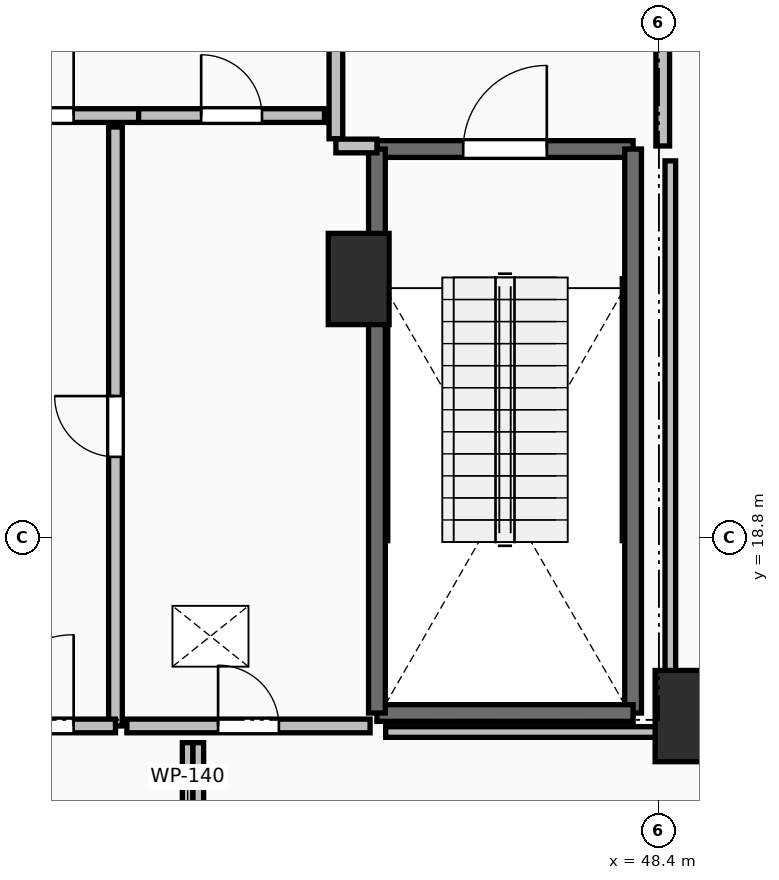
"""IFC4 building model, lengths in metres.
Left out: names, types, materials, properties, quantities, classifications, styles, units other than length and angle.
Written with IfcOpenShell. Run it as: python <this file> out.ifc"""

import sys

from ifc_helpers import new_model, si_unit, direction, frame, frame_2d, origin, origin_2d, place, context, subcontext, project, spatial, rectangle, extrude, element, fill, save


model = new_model("IFC4")
c1 = context("Model", 3, precision=1e-05, world=origin(), true_north=direction((0.0, 1.0)))
c2 = subcontext(c1, "Body", "Model", "MODEL_VIEW")
j1 = project(units=[si_unit("LENGTHUNIT", "METRE"), si_unit("PLANEANGLEUNIT", "RADIAN")], contexts=[c1])
p1 = place(None, origin())
s1 = spatial("IfcSite", under=j1, at=p1, CompositionType="ELEMENT")
p2 = place(p1, origin())
s2 = spatial("IfcBuilding", under=s1, at=p2, CompositionType="ELEMENT")
p3 = place(p2, frame((0.0, 0.0, 174.6)))
s3 = spatial("IfcBuildingStorey", under=s2, at=p3, CompositionType="ELEMENT", Elevation=174.6)
for number, where, z_axis, x_axis in (
    (1, (48.75, 16.45, 0.0), (0.0, 0.0, 1.0), (1.0, 0.0, 0.0)),
    (2, (44.45, 22.2, 0.0), (0.0, 0.0, 1.0), (1.0, 0.0, 0.0)),
):
    element("IfcColumn", number, at=place(p3, frame(where, z_axis=z_axis, x_axis=x_axis)), inside=s3, PredefinedType="PILASTER", context=c2, shape_type="SweptSolid", body=[
        extrude(rectangle(XDim=0.8, YDim=1.2, at=origin_2d()), origin(), (0.0, 0.0, 1.0), 4.5),
    ])
p4 = place(p3, frame((44.69, 23.91, 0.0), z_axis=(0.0, 0.0, 1.0), x_axis=(1.0, 0.0, 0.0)))
e3 = element("IfcWall", 3, at=p4, inside=s3, PredefinedType="SOLIDWALL", context=c2, shape_type="SweptSolid", body=[
    extrude(rectangle(XDim=3.37, YDim=0.22, at=frame_2d((1.685, 0.0))), origin(), (0.0, 0.0, 1.0), 4.24),
])
p5 = place(p4, frame((1.135, 0.0, 0.0)))
e4 = element("IfcOpeningElement", 4, at=p5, cuts=e3, PredefinedType="OPENING", context=c2, shape_type="SweptSolid", body=[
    extrude(rectangle(XDim=1.1, YDim=2.15, at=frame_2d((0.55, 1.075))), frame((0.0, 0.125, 0.0), z_axis=(0.0, -1.0, 0.0), x_axis=(1.0, 0.0, 0.0)), (0.0, 0.0, 1.0), 0.25),
])
p6 = place(p3, frame((48.06, 23.91, 0.0), z_axis=(0.0, 0.0, 1.0), x_axis=(0.0, -1.0, 0.0)))
e5 = element("IfcWall", 5, at=p6, inside=s3, PredefinedType="SOLIDWALL", context=c2, shape_type="SweptSolid", body=[
    extrude(rectangle(XDim=7.42, YDim=0.22, at=frame_2d((3.71, 0.0))), origin(), (0.0, 0.0, 1.0), 4.24),
])
p7 = place(p3, frame((48.06, 16.49, 0.0), z_axis=(0.0, 0.0, 1.0), x_axis=(-1.0, 0.0, 0.0)))
e6 = element("IfcWall", 6, at=p7, inside=s3, PredefinedType="SOLIDWALL", context=c2, shape_type="SweptSolid", body=[
    extrude(rectangle(XDim=3.37, YDim=0.22, at=frame_2d((1.685, 0.0))), origin(), (0.0, 0.0, 1.0), 4.24),
])
p8 = place(p3, frame((44.69, 16.49, 0.0), z_axis=(0.0, 0.0, 1.0), x_axis=(0.0, 1.0, 0.0)))
e7 = element("IfcWall", 7, at=p8, inside=s3, PredefinedType="SOLIDWALL", context=c2, shape_type="SweptSolid", body=[
    extrude(rectangle(XDim=7.42, YDim=0.22, at=frame_2d((3.71, 0.0))), origin(), (0.0, 0.0, 1.0), 4.24),
])
p9 = place(p3, frame((44.15, 27.955, 0.0), z_axis=(0.0, 0.0, 1.0), x_axis=(0.0, -1.0, 0.0)))
e8 = element("IfcWall", 8, at=p9, inside=s3, PredefinedType="PARTITIONING", context=c2, shape_type="SweptSolid", body=[
    extrude(rectangle(XDim=3.91, YDim=0.18, at=frame_2d((1.955, 0.0))), origin(), (0.0, 0.0, 1.0), 4.24),
])
p10 = place(p9, frame((1.355, 0.0, 0.0)))
e9 = element("IfcOpeningElement", 9, at=p10, cuts=e8, PredefinedType="OPENING", context=c2, shape_type="SweptSolid", body=[
    extrude(rectangle(XDim=1.2, YDim=2.15, at=frame_2d((0.6, 1.075))), frame((0.0, 0.105, 0.0), z_axis=(0.0, -1.0, 0.0), x_axis=(1.0, 0.0, 0.0)), (0.0, 0.0, 1.0), 0.21),
])
p11 = place(p3, frame((44.15, 23.95, 0.0), z_axis=(0.0, 0.0, 1.0), x_axis=(1.0, 0.0, 0.0)))
e10 = element("IfcWall", 10, at=p11, inside=s3, PredefinedType="PARTITIONING", context=c2, shape_type="SweptSolid", body=[
    extrude(rectangle(XDim=0.54, YDim=0.18, at=frame_2d((0.27, 0.0))), origin(), (0.0, 0.0, 1.0), 4.24),
])
p12 = place(p3, frame((48.45, 23.95, 0.0), z_axis=(0.0, 0.0, 1.0), x_axis=(0.0, 1.0, 0.0)))
e11 = element("IfcWall", 11, at=p12, inside=s3, PredefinedType="PARTITIONING", context=c2, shape_type="SweptSolid", body=[
    extrude(rectangle(XDim=4.05, YDim=0.18, at=frame_2d((2.025, 0.0))), origin(), (0.0, 0.0, 1.0), 4.24),
])
p13 = place(p12, frame((1.425, 0.0, 0.0)))
e12 = element("IfcOpeningElement", 12, at=p13, cuts=e11, PredefinedType="OPENING", context=c2, shape_type="SweptSolid", body=[
    extrude(rectangle(XDim=1.2, YDim=2.15, at=frame_2d((0.6, 1.075))), frame((0.0, 0.105, 0.0), z_axis=(0.0, -1.0, 0.0), x_axis=(1.0, 0.0, 0.0)), (0.0, 0.0, 1.0), 0.21),
])
p14 = place(p3, frame((38.645, 24.35, 0.0), z_axis=(0.0, 0.0, 1.0), x_axis=(1.0, 0.0, 0.0)))
e13 = element("IfcWall", 13, at=p14, inside=s3, PredefinedType="PARTITIONING", context=c2, shape_type="SweptSolid", body=[
    extrude(rectangle(XDim=2.91, YDim=0.18, at=frame_2d((1.455, 0.0))), origin(), (0.0, 0.0, 1.0), 4.24),
])
p15 = place(p14, frame((0.855, 0.0, 0.0)))
e14 = element("IfcOpeningElement", 14, at=p15, cuts=e13, PredefinedType="OPENING", context=c2, shape_type="SweptSolid", body=[
    extrude(rectangle(XDim=1.2, YDim=2.15, at=frame_2d((0.6, 1.075))), frame((0.0, 0.105, 0.0), z_axis=(0.0, -1.0, 0.0), x_axis=(1.0, 0.0, 0.0)), (0.0, 0.0, 1.0), 0.21),
])
p16 = place(p3, frame((41.555, 24.35, 0.0), z_axis=(0.0, 0.0, 1.0), x_axis=(1.0, 0.0, 0.0)))
e15 = element("IfcWall", 15, at=p16, inside=s3, PredefinedType="PARTITIONING", context=c2, shape_type="SweptSolid", body=[
    extrude(rectangle(XDim=2.445, YDim=0.18, at=frame_2d((1.223, 0.0))), origin(), (0.0, 0.0, 1.0), 4.24),
])
p17 = place(p16, frame((0.823, 0.0, 0.0)))
e16 = element("IfcOpeningElement", 16, at=p17, cuts=e15, PredefinedType="OPENING", context=c2, shape_type="SweptSolid", body=[
    extrude(rectangle(XDim=0.8, YDim=2.05, at=frame_2d((0.4, 1.025))), frame((0.0, 0.105, 0.0), z_axis=(0.0, -1.0, 0.0), x_axis=(1.0, 0.0, 0.0)), (0.0, 0.0, 1.0), 0.21),
])
p18 = place(p3, frame((41.25, 16.32, 0.0), z_axis=(0.0, 0.0, 1.0), x_axis=(0.0, 1.0, 0.0)))
e17 = element("IfcWall", 17, at=p18, inside=s3, PredefinedType="PARTITIONING", context=c2, shape_type="SweptSolid", body=[
    extrude(rectangle(XDim=7.88, YDim=0.18, at=frame_2d((3.94, 0.0))), origin(), (0.0, 0.0, 1.0), 4.24),
])
p19 = place(p18, frame((3.54, 0.0, 0.0)))
e18 = element("IfcOpeningElement", 18, at=p19, cuts=e17, PredefinedType="OPENING", context=c2, shape_type="SweptSolid", body=[
    extrude(rectangle(XDim=0.8, YDim=2.05, at=frame_2d((0.4, 1.025))), frame((0.0, 0.105, 0.0), z_axis=(0.0, -1.0, 0.0), x_axis=(1.0, 0.0, 0.0)), (0.0, 0.0, 1.0), 0.21),
])
p20 = place(p3, frame((38.95, 16.32, 0.0), z_axis=(0.0, 0.0, 1.0), x_axis=(1.0, 0.0, 0.0)))
e19 = element("IfcWall", 19, at=p20, inside=s3, PredefinedType="PARTITIONING", context=c2, shape_type="SweptSolid", body=[
    extrude(rectangle(XDim=2.3, YDim=0.18, at=frame_2d((1.15, 0.0))), origin(), (0.0, 0.0, 1.0), 4.24),
])
p21 = place(p20, frame((0.55, 0.0, 0.0)))
e20 = element("IfcOpeningElement", 20, at=p21, cuts=e19, PredefinedType="OPENING", context=c2, shape_type="SweptSolid", body=[
    extrude(rectangle(XDim=1.2, YDim=2.15, at=frame_2d((0.6, 1.075))), frame((0.0, 0.105, 0.0), z_axis=(0.0, -1.0, 0.0), x_axis=(1.0, 0.0, 0.0)), (0.0, 0.0, 1.0), 0.21),
])
p22 = place(p3, frame((41.4, 16.32, 0.0), z_axis=(0.0, 0.0, 1.0), x_axis=(1.0, 0.0, 0.0)))
e21 = element("IfcWall", 21, at=p22, inside=s3, PredefinedType="PARTITIONING", context=c2, shape_type="SweptSolid", body=[
    extrude(rectangle(XDim=3.2, YDim=0.18, at=frame_2d((1.6, 0.0))), origin(), (0.0, 0.0, 1.0), 4.24),
])
p23 = place(p22, frame((1.2, 0.0, 0.0)))
e22 = element("IfcOpeningElement", 22, at=p23, cuts=e21, PredefinedType="OPENING", context=c2, shape_type="SweptSolid", body=[
    extrude(rectangle(XDim=0.8, YDim=2.05, at=frame_2d((0.4, 1.025))), frame((0.0, 0.105, 0.0), z_axis=(0.0, -1.0, 0.0), x_axis=(1.0, 0.0, 0.0)), (0.0, 0.0, 1.0), 0.21),
])
p24 = place(p3, frame((48.55, 16.24, 0.0), z_axis=(0.0, 0.0, 1.0), x_axis=(0.0, 1.0, 0.0)))
e23 = element("IfcWall", 23, at=p24, inside=s3, PredefinedType="PARTITIONING", context=c2, shape_type="SweptSolid", body=[
    extrude(rectangle(XDim=7.514, YDim=0.14, at=frame_2d((3.757, 0.0))), origin(), (0.0, 0.0, 1.0), 3.432),
])
for number, where, z_axis, x_axis in (
    (24, (42.2, 16.1, 0.0), (0.0, 0.0, 1.0), (0.0, -1.0, 0.0)),
    (25, (42.34, 14.27, 0.0), (0.0, 0.0, 1.0), (0.0, 1.0, 0.0)),
):
    element("IfcWall", number, at=place(p3, frame(where, z_axis=z_axis, x_axis=x_axis)), inside=s3, PredefinedType="PARTITIONING", context=c2, shape_type="SweptSolid", body=[
        extrude(rectangle(XDim=1.83, YDim=0.14, at=frame_2d((0.915, 0.0))), origin(), (0.0, 0.0, 1.0), 3.929),
    ])
p25 = place(p3, frame((44.805, 16.24, 0.0), z_axis=(0.0, 0.0, 1.0), x_axis=(1.0, 0.0, 0.0)))
e26 = element("IfcWall", 26, at=p25, inside=s3, PredefinedType="PARTITIONING", context=c2, shape_type="SweptSolid", body=[
    extrude(rectangle(XDim=3.745, YDim=0.14, at=frame_2d((1.873, 0.0))), origin(), (0.0, 0.0, 1.0), 3.432),
])
p26 = place(p5, origin())
e27 = element("IfcDoor", 27, at=p26, inside=s3, OperationType="SINGLE_SWING_RIGHT", PredefinedType="DOOR", context=c2, shape_type="SweptSolid", body=[
    extrude(rectangle(XDim=1.1, YDim=2.15, at=frame_2d((0.55, 1.075))), frame((0.0, 0.025, 0.0), z_axis=(0.0, -1.0, 0.0), x_axis=(1.0, 0.0, 0.0)), (0.0, 0.0, 1.0), 0.05),
])
fill(e4, e27)
p27 = place(p15, origin())
e28 = element("IfcDoor", 28, at=p27, inside=s3, OperationType="SINGLE_SWING_RIGHT", PredefinedType="DOOR", context=c2, shape_type="SweptSolid", body=[
    extrude(rectangle(XDim=1.2, YDim=2.15, at=frame_2d((0.6, 1.075))), frame((0.0, 0.025, 0.0), z_axis=(0.0, -1.0, 0.0), x_axis=(1.0, 0.0, 0.0)), (0.0, 0.0, 1.0), 0.05),
])
fill(e14, e28)
p28 = place(p17, origin())
e29 = element("IfcDoor", 29, at=p28, inside=s3, OperationType="SINGLE_SWING_LEFT", PredefinedType="DOOR", context=c2, shape_type="SweptSolid", body=[
    extrude(rectangle(XDim=0.8, YDim=2.05, at=frame_2d((0.4, 1.025))), frame((0.0, 0.025, 0.0), z_axis=(0.0, -1.0, 0.0), x_axis=(1.0, 0.0, 0.0)), (0.0, 0.0, 1.0), 0.05),
])
fill(e16, e29)
p29 = place(p19, origin())
e30 = element("IfcDoor", 30, at=p29, inside=s3, OperationType="SINGLE_SWING_RIGHT", PredefinedType="DOOR", context=c2, shape_type="SweptSolid", body=[
    extrude(rectangle(XDim=0.8, YDim=2.05, at=frame_2d((0.4, 1.025))), frame((0.0, 0.025, 0.0), z_axis=(0.0, -1.0, 0.0), x_axis=(1.0, 0.0, 0.0)), (0.0, 0.0, 1.0), 0.05),
])
fill(e18, e30)
p30 = place(p21, origin())
e31 = element("IfcDoor", 31, at=p30, inside=s3, OperationType="SINGLE_SWING_RIGHT", PredefinedType="DOOR", context=c2, shape_type="SweptSolid", body=[
    extrude(rectangle(XDim=1.2, YDim=2.15, at=frame_2d((0.6, 1.075))), frame((0.0, 0.025, 0.0), z_axis=(0.0, -1.0, 0.0), x_axis=(1.0, 0.0, 0.0)), (0.0, 0.0, 1.0), 0.05),
])
fill(e20, e31)
p31 = place(p23, origin())
e32 = element("IfcDoor", 32, at=p31, inside=s3, OperationType="SINGLE_SWING_LEFT", PredefinedType="DOOR", context=c2, shape_type="SweptSolid", body=[
    extrude(rectangle(XDim=0.8, YDim=2.05, at=frame_2d((0.4, 1.025))), frame((0.0, 0.025, 0.0), z_axis=(0.0, -1.0, 0.0), x_axis=(1.0, 0.0, 0.0)), (0.0, 0.0, 1.0), 0.05),
])
fill(e22, e32)
save(model, sys.argv[1])
